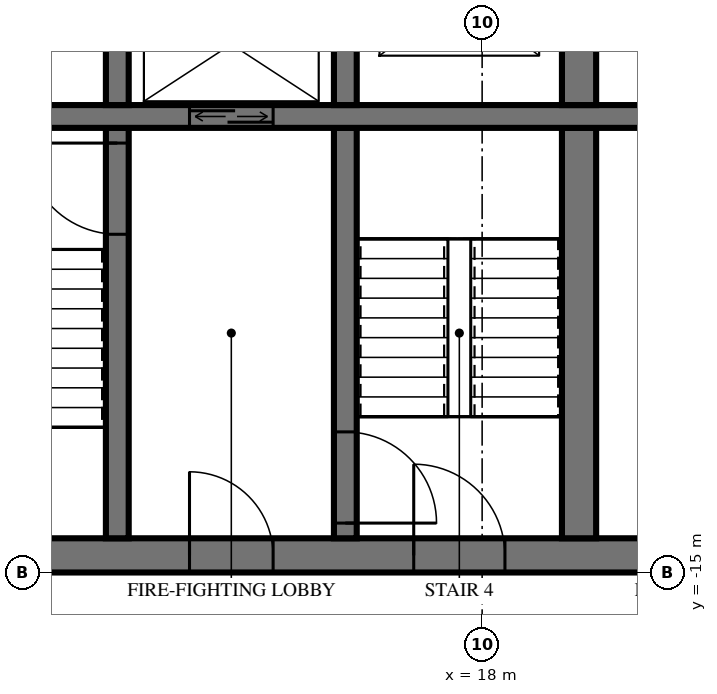
"""IFC4 building model, lengths in metres.
Left out: names, types, materials, properties, quantities, classifications, styles, units other than length and angle.
Written with IfcOpenShell. Run it as: python <this file> out.ifc"""

import sys

from ifc_helpers import new_model, si_unit, direction, frame, frame_2d, origin, place, context, subcontext, project, spatial, rectangle, extrude, element, fill, save


model = new_model("IFC4")
c1 = context("Model", 3, precision=1e-05, world=origin(), true_north=direction((0.0, 1.0)))
c2 = subcontext(c1, "Body", "Model", "MODEL_VIEW")
j1 = project(units=[si_unit("LENGTHUNIT", "METRE"), si_unit("PLANEANGLEUNIT", "RADIAN")], contexts=[c1])
p1 = place(None, origin())
s1 = spatial("IfcSite", under=j1, at=p1, CompositionType="ELEMENT")
p2 = place(p1, origin())
s2 = spatial("IfcBuilding", under=s1, at=p2, CompositionType="ELEMENT")
p3 = place(p2, frame((0.0, 0.0, 239.6)))
s3 = spatial("IfcBuildingStorey", under=s2, at=p3, CompositionType="ELEMENT", Elevation=239.6)
p4 = place(p3, frame((10.0, -14.775, 0.0), z_axis=(0.0, 0.0, 1.0), x_axis=(1.0, 0.0, 0.0)))
e1 = element("IfcWall", 1, at=p4, inside=s3, PredefinedType="SHEAR", context=c2, shape_type="SweptSolid", body=[
    extrude(rectangle(XDim=14.5, YDim=0.45, at=frame_2d((7.25, 0.0))), origin(), (0.0, 0.0, 1.0), 3.5),
])
p5 = place(p4, frame((7.1, 0.0, 0.0)))
e2 = element("IfcOpeningElement", 2, at=p5, cuts=e1, PredefinedType="OPENING", context=c2, shape_type="SweptSolid", body=[
    extrude(rectangle(XDim=1.2, YDim=2.1, at=frame_2d((0.6, 1.05))), frame((0.0, 0.235, 0.0), z_axis=(0.0, -1.0, 0.0), x_axis=(1.0, 0.0, 0.0)), (0.0, 0.0, 1.0), 0.47),
])
p6 = place(p4, frame((4.15, 0.0, 0.0)))
e3 = element("IfcOpeningElement", 3, at=p6, cuts=e1, PredefinedType="OPENING", context=c2, shape_type="SweptSolid", body=[
    extrude(rectangle(XDim=1.1, YDim=2.1, at=frame_2d((0.55, 1.05))), frame((0.0, 0.235, 0.0), z_axis=(0.0, -1.0, 0.0), x_axis=(1.0, 0.0, 0.0)), (0.0, 0.0, 1.0), 0.47),
])
p7 = place(p4, frame((10.1, 0.0, 0.0)))
e4 = element("IfcOpeningElement", 4, at=p7, cuts=e1, PredefinedType="OPENING", context=c2, shape_type="SweptSolid", body=[
    extrude(rectangle(XDim=0.9, YDim=2.1, at=frame_2d((0.45, 1.05))), frame((0.0, 0.235, 0.0), z_axis=(0.0, -1.0, 0.0), x_axis=(1.0, 0.0, 0.0)), (0.0, 0.0, 1.0), 0.47),
])
p8 = place(p4, frame((12.45, 0.0, 0.0)))
e5 = element("IfcOpeningElement", 5, at=p8, cuts=e1, PredefinedType="OPENING", context=c2, shape_type="SweptSolid", body=[
    extrude(rectangle(XDim=1.0, YDim=2.1, at=frame_2d((0.5, 1.05))), frame((0.0, 0.235, 0.0), z_axis=(0.0, -1.0, 0.0), x_axis=(1.0, 0.0, 0.0)), (0.0, 0.0, 1.0), 0.47),
])
p9 = place(p3, frame((10.35, -9.0, 0.0), z_axis=(0.0, 0.0, 1.0), x_axis=(1.0, 0.0, 0.0)))
e6 = element("IfcWall", 6, at=p9, inside=s3, PredefinedType="SHEAR", context=c2, shape_type="SweptSolid", body=[
    extrude(rectangle(XDim=13.7, YDim=0.3, at=frame_2d((6.85, 0.0))), origin(), (0.0, 0.0, 1.0), 3.5),
])
p10 = place(p9, frame((3.8, 0.0, 0.0)))
e7 = element("IfcOpeningElement", 7, at=p10, cuts=e6, PredefinedType="OPENING", context=c2, shape_type="SweptSolid", body=[
    extrude(rectangle(XDim=1.1, YDim=2.1, at=frame_2d((0.55, 1.05))), frame((0.0, 0.16, 0.0), z_axis=(0.0, -1.0, 0.0), x_axis=(1.0, 0.0, 0.0)), (0.0, 0.0, 1.0), 0.32),
])
p11 = place(p3, frame((13.2, -8.85, 0.0), z_axis=(0.0, 0.0, 1.0), x_axis=(0.0, 1.0, 0.0)))
e8 = element("IfcWall", 8, at=p11, inside=s3, PredefinedType="SHEAR", context=c2, shape_type="SweptSolid", body=[
    extrude(rectangle(XDim=2.3, YDim=0.3, at=frame_2d((1.15, 0.0))), origin(), (0.0, 0.0, 1.0), 3.5),
])
p12 = place(p3, frame((13.2, -14.55, 0.0), z_axis=(0.0, 0.0, 1.0), x_axis=(0.0, 1.0, 0.0)))
e9 = element("IfcWall", 9, at=p12, inside=s3, PredefinedType="SHEAR", context=c2, shape_type="SweptSolid", body=[
    extrude(rectangle(XDim=5.4, YDim=0.3, at=frame_2d((2.7, 0.0))), origin(), (0.0, 0.0, 1.0), 3.5),
])
p13 = place(p12, frame((4.0, 0.0, 0.0)))
e10 = element("IfcOpeningElement", 10, at=p13, cuts=e9, PredefinedType="OPENING", context=c2, shape_type="SweptSolid", body=[
    extrude(rectangle(XDim=1.2, YDim=2.1, at=frame_2d((0.6, 1.05))), frame((0.0, 0.16, 0.0), z_axis=(0.0, -1.0, 0.0), x_axis=(1.0, 0.0, 0.0)), (0.0, 0.0, 1.0), 0.32),
])
p14 = place(p3, frame((16.2, -8.85, 0.0), z_axis=(0.0, 0.0, 1.0), x_axis=(0.0, 1.0, 0.0)))
e11 = element("IfcWall", 11, at=p14, inside=s3, PredefinedType="SHEAR", context=c2, shape_type="SweptSolid", body=[
    extrude(rectangle(XDim=2.3, YDim=0.3, at=frame_2d((1.15, 0.0))), origin(), (0.0, 0.0, 1.0), 3.5),
])
p15 = place(p3, frame((16.2, -14.55, 0.0), z_axis=(0.0, 0.0, 1.0), x_axis=(0.0, 1.0, 0.0)))
e12 = element("IfcWall", 12, at=p15, inside=s3, PredefinedType="SHEAR", context=c2, shape_type="SweptSolid", body=[
    extrude(rectangle(XDim=5.4, YDim=0.3, at=frame_2d((2.7, 0.0))), origin(), (0.0, 0.0, 1.0), 3.5),
])
p16 = place(p15, frame((0.2, 0.0, 0.0)))
e13 = element("IfcOpeningElement", 13, at=p16, cuts=e12, PredefinedType="OPENING", context=c2, shape_type="SweptSolid", body=[
    extrude(rectangle(XDim=1.2, YDim=2.1, at=frame_2d((0.6, 1.05))), frame((0.0, 0.16, 0.0), z_axis=(0.0, -1.0, 0.0), x_axis=(1.0, 0.0, 0.0)), (0.0, 0.0, 1.0), 0.32),
])
p17 = place(p3, frame((19.275, -8.85, 0.0), z_axis=(0.0, 0.0, 1.0), x_axis=(0.0, 1.0, 0.0)))
e14 = element("IfcWall", 14, at=p17, inside=s3, PredefinedType="SHEAR", context=c2, shape_type="SweptSolid", body=[
    extrude(rectangle(XDim=2.3, YDim=0.45, at=frame_2d((1.15, 0.0))), origin(), (0.0, 0.0, 1.0), 3.5),
])
p18 = place(p3, frame((19.275, -14.55, 0.0), z_axis=(0.0, 0.0, 1.0), x_axis=(0.0, 1.0, 0.0)))
e15 = element("IfcWall", 15, at=p18, inside=s3, PredefinedType="SHEAR", context=c2, shape_type="SweptSolid", body=[
    extrude(rectangle(XDim=5.4, YDim=0.45, at=frame_2d((2.7, 0.0))), origin(), (0.0, 0.0, 1.0), 3.5),
])
p19 = place(p10, origin())
e16 = element("IfcDoor", 16, at=p19, inside=s3, OperationType="DOUBLE_DOOR_SLIDING", PredefinedType="USERDEFINED", context=c2, shape_type="SweptSolid", body=[
    extrude(rectangle(XDim=1.1, YDim=2.1, at=frame_2d((0.55, 1.05))), frame((0.0, 0.025, 0.0), z_axis=(0.0, -1.0, 0.0), x_axis=(1.0, 0.0, 0.0)), (0.0, 0.0, 1.0), 0.05),
])
fill(e7, e16)
p20 = place(p5, origin())
e17 = element("IfcDoor", 17, at=p20, inside=s3, OperationType="SINGLE_SWING_RIGHT", PredefinedType="DOOR", context=c2, shape_type="SweptSolid", body=[
    extrude(rectangle(XDim=1.2, YDim=2.1, at=frame_2d((0.6, 1.05))), frame((0.0, 0.025, 0.0), z_axis=(0.0, -1.0, 0.0), x_axis=(1.0, 0.0, 0.0)), (0.0, 0.0, 1.0), 0.05),
])
fill(e2, e17)
p21 = place(p6, origin())
e18 = element("IfcDoor", 18, at=p21, inside=s3, OperationType="SINGLE_SWING_RIGHT", PredefinedType="DOOR", context=c2, shape_type="SweptSolid", body=[
    extrude(rectangle(XDim=1.1, YDim=2.1, at=frame_2d((0.55, 1.05))), frame((0.0, 0.025, 0.0), z_axis=(0.0, -1.0, 0.0), x_axis=(1.0, 0.0, 0.0)), (0.0, 0.0, 1.0), 0.05),
])
fill(e3, e18)
p22 = place(p13, origin())
e19 = element("IfcDoor", 19, at=p22, inside=s3, OperationType="SINGLE_SWING_LEFT", PredefinedType="DOOR", context=c2, shape_type="SweptSolid", body=[
    extrude(rectangle(XDim=1.2, YDim=2.1, at=frame_2d((0.6, 1.05))), frame((0.0, 0.025, 0.0), z_axis=(0.0, -1.0, 0.0), x_axis=(1.0, 0.0, 0.0)), (0.0, 0.0, 1.0), 0.05),
])
fill(e10, e19)
p23 = place(p16, frame((0.6, 0.0, 0.0), z_axis=(0.0, 0.0, 1.0), x_axis=(-1.0, 0.0, 0.0)))
e20 = element("IfcDoor", 20, at=p23, inside=s3, OperationType="SINGLE_SWING_LEFT", PredefinedType="DOOR", context=c2, shape_type="SweptSolid", body=[
    extrude(rectangle(XDim=1.2, YDim=2.1, at=frame_2d((0.0, 1.05))), frame((0.0, -0.025, 0.0), z_axis=(0.0, 1.0, 0.0), x_axis=(-1.0, 0.0, 0.0)), (0.0, 0.0, 1.0), 0.05),
])
fill(e13, e20)
save(model, sys.argv[1])
